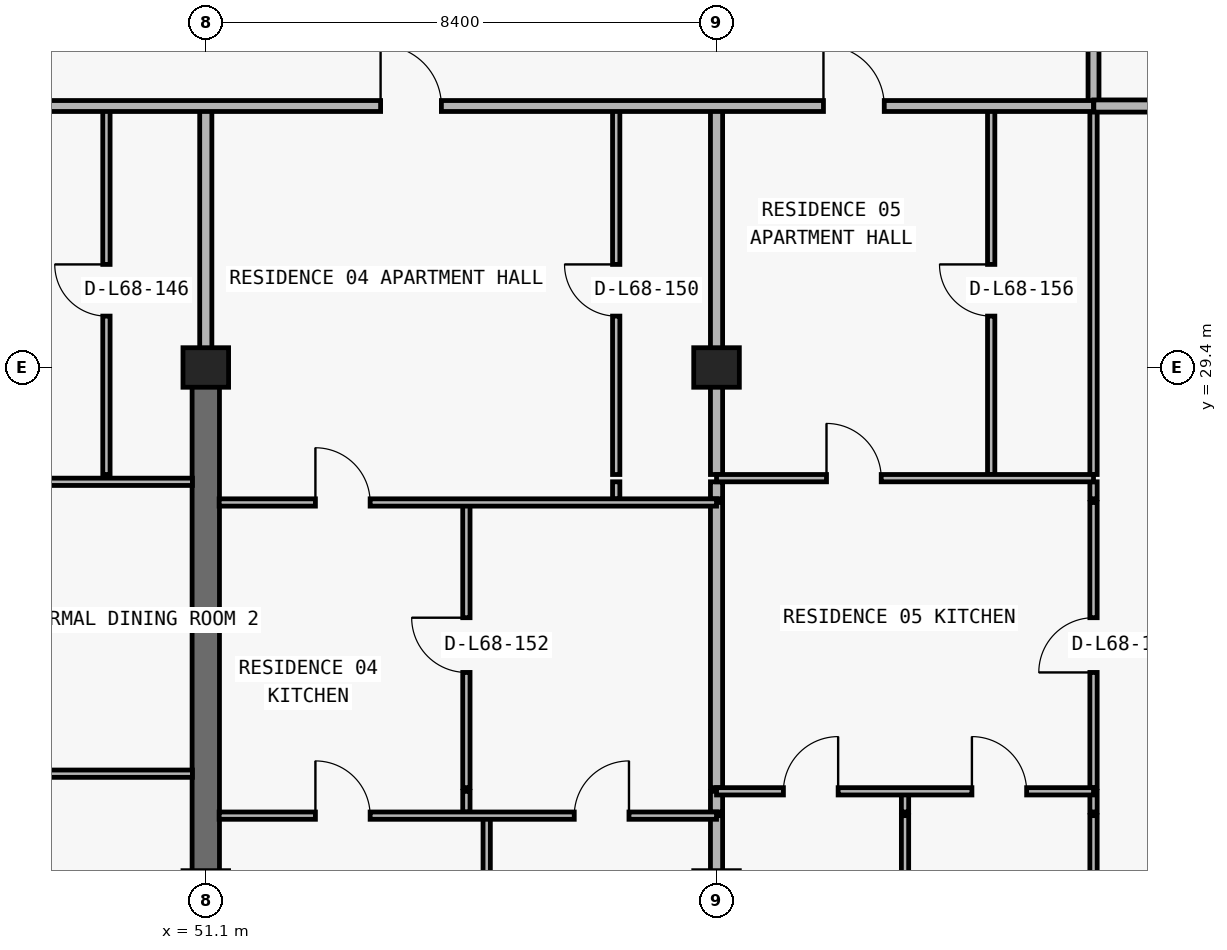
"""IFC4 building model, lengths in metres.
Left out: names, types, materials, properties, quantities, classifications, styles, units other than length and angle.
Written with IfcOpenShell. Run it as: python <this file> out.ifc"""

import sys

from ifc_helpers import new_model, si_unit, direction, frame, frame_2d, origin, origin_2d, place, context, subcontext, project, spatial, rectangle, extrude, element, fill, save


model = new_model("IFC4")
c1 = context("Model", 3, precision=1e-05, world=origin(), true_north=direction((0.0, 1.0)))
c2 = subcontext(c1, "Body", "Model", "MODEL_VIEW")
j1 = project(units=[si_unit("LENGTHUNIT", "METRE"), si_unit("PLANEANGLEUNIT", "RADIAN")], contexts=[c1])
p1 = place(None, origin())
s1 = spatial("IfcSite", under=j1, at=p1, CompositionType="ELEMENT")
p2 = place(p1, origin())
s2 = spatial("IfcBuilding", under=s1, at=p2, CompositionType="ELEMENT")
p3 = place(p2, frame((0.0, 0.0, 243.0)))
s3 = spatial("IfcBuildingStorey", under=s2, at=p3, CompositionType="ELEMENT", Elevation=243.0)
for number, where, z_axis, x_axis in (
    (1, (51.1, 29.4, 0.0), (0.0, 0.0, 1.0), (1.0, 0.0, 0.0)),
    (2, (59.5, 29.4, 0.0), (0.0, 0.0, 1.0), (1.0, 0.0, 0.0)),
):
    element("IfcColumn", number, at=place(p3, frame(where, z_axis=z_axis, x_axis=x_axis)), inside=s3, PredefinedType="COLUMN", context=c2, shape_type="SweptSolid", body=[
        extrude(rectangle(XDim=0.75, YDim=0.65, at=origin_2d()), origin(), (0.0, 0.0, 1.0), 3.05),
    ])
p4 = place(p3, frame((51.1, 20.8, 0.0), z_axis=(0.0, 0.0, 1.0), x_axis=(0.0, 1.0, 0.0)))
e3 = element("IfcWall", 3, at=p4, inside=s3, PredefinedType="SHEAR", context=c2, shape_type="SweptSolid", body=[
    extrude(rectangle(XDim=8.6, YDim=0.45, at=frame_2d((4.3, 0.0))), origin(), (0.0, 0.0, 1.0), 3.05),
])
p5 = place(p3, frame((49.466, 27.64, 0.0), z_axis=(0.0, 0.0, 1.0), x_axis=(0.0, 1.0, 0.0)))
e4 = element("IfcWall", 4, at=p5, inside=s3, PredefinedType="PARTITIONING", context=c2, shape_type="SweptSolid", body=[
    extrude(rectangle(XDim=6.06, YDim=0.12, at=frame_2d((3.03, 0.0))), origin(), (0.0, 0.0, 1.0), 3.05),
])
p6 = place(p5, frame((2.605, 0.0, 0.0)))
e5 = element("IfcOpeningElement", 5, at=p6, cuts=e4, PredefinedType="OPENING", context=c2, shape_type="SweptSolid", body=[
    extrude(rectangle(XDim=0.85, YDim=2.1, at=frame_2d((0.425, 1.05))), frame((0.0, 0.07, 0.0), z_axis=(0.0, -1.0, 0.0), x_axis=(1.0, 0.0, 0.0)), (0.0, 0.0, 1.0), 0.14),
])
p7 = place(p3, frame((51.1, 29.405, 0.0), z_axis=(0.0, 0.0, 1.0), x_axis=(0.0, 1.0, 0.0)))
e6 = element("IfcWall", 6, at=p7, inside=s3, PredefinedType="PARTITIONING", context=c2, shape_type="SweptSolid", body=[
    extrude(rectangle(XDim=4.295, YDim=0.2, at=frame_2d((2.147, 0.0))), origin(), (0.0, 0.0, 1.0), 2.335),
])
p8 = place(p3, frame((55.386, 22.09, 0.0), z_axis=(0.0, 0.0, 1.0), x_axis=(0.0, 1.0, 0.0)))
e7 = element("IfcWall", 7, at=p8, inside=s3, PredefinedType="PARTITIONING", context=c2, shape_type="SweptSolid", body=[
    extrude(rectangle(XDim=0.34, YDim=0.12, at=frame_2d((0.17, 0.0))), origin(), (0.0, 0.0, 1.0), 3.05),
])
p9 = place(p3, frame((55.386, 22.49, 0.0), z_axis=(0.0, 0.0, 1.0), x_axis=(0.0, 1.0, 0.0)))
e8 = element("IfcWall", 8, at=p9, inside=s3, PredefinedType="PARTITIONING", context=c2, shape_type="SweptSolid", body=[
    extrude(rectangle(XDim=4.69, YDim=0.12, at=frame_2d((2.345, 0.0))), origin(), (0.0, 0.0, 1.0), 3.05),
])
p10 = place(p9, frame((1.895, 0.0, 0.0)))
e9 = element("IfcOpeningElement", 9, at=p10, cuts=e8, PredefinedType="OPENING", context=c2, shape_type="SweptSolid", body=[
    extrude(rectangle(XDim=0.9, YDim=2.15, at=frame_2d((0.45, 1.075))), frame((0.0, 0.07, 0.0), z_axis=(0.0, -1.0, 0.0), x_axis=(1.0, 0.0, 0.0)), (0.0, 0.0, 1.0), 0.14),
])
p11 = place(p3, frame((55.72, 13.34, 0.0), z_axis=(0.0, 0.0, 1.0), x_axis=(0.0, 1.0, 0.0)))
e10 = element("IfcWall", 10, at=p11, inside=s3, PredefinedType="PARTITIONING", context=c2, shape_type="SweptSolid", body=[
    extrude(rectangle(XDim=8.69, YDim=0.12, at=frame_2d((4.345, 0.0))), origin(), (0.0, 0.0, 1.0), 3.05),
])
p12 = place(p3, frame((57.85, 27.24, 0.0), z_axis=(0.0, 0.0, 1.0), x_axis=(0.0, 1.0, 0.0)))
e11 = element("IfcWall", 11, at=p12, inside=s3, PredefinedType="PARTITIONING", context=c2, shape_type="SweptSolid", body=[
    extrude(rectangle(XDim=0.28, YDim=0.12, at=frame_2d((0.14, 0.0))), origin(), (0.0, 0.0, 1.0), 3.05),
])
p13 = place(p3, frame((57.85, 27.64, 0.0), z_axis=(0.0, 0.0, 1.0), x_axis=(0.0, 1.0, 0.0)))
e12 = element("IfcWall", 12, at=p13, inside=s3, PredefinedType="PARTITIONING", context=c2, shape_type="SweptSolid", body=[
    extrude(rectangle(XDim=6.06, YDim=0.12, at=frame_2d((3.03, 0.0))), origin(), (0.0, 0.0, 1.0), 3.05),
])
p14 = place(p13, frame((2.605, 0.0, 0.0)))
e13 = element("IfcOpeningElement", 13, at=p14, cuts=e12, PredefinedType="OPENING", context=c2, shape_type="SweptSolid", body=[
    extrude(rectangle(XDim=0.85, YDim=2.1, at=frame_2d((0.425, 1.05))), frame((0.0, 0.07, 0.0), z_axis=(0.0, -1.0, 0.0), x_axis=(1.0, 0.0, 0.0)), (0.0, 0.0, 1.0), 0.14),
])
p15 = place(p3, frame((59.5, 13.34, 0.0), z_axis=(0.0, 0.0, 1.0), x_axis=(0.0, 1.0, 0.0)))
e14 = element("IfcWall", 14, at=p15, inside=s3, PredefinedType="PARTITIONING", context=c2, shape_type="SweptSolid", body=[
    extrude(rectangle(XDim=8.69, YDim=0.2, at=frame_2d((4.345, 0.0))), origin(), (0.0, 0.0, 1.0), 2.263),
])
p16 = place(p3, frame((59.5, 22.09, 0.0), z_axis=(0.0, 0.0, 1.0), x_axis=(0.0, 1.0, 0.0)))
e15 = element("IfcWall", 15, at=p16, inside=s3, PredefinedType="PARTITIONING", context=c2, shape_type="SweptSolid", body=[
    extrude(rectangle(XDim=0.34, YDim=0.2, at=frame_2d((0.17, 0.0))), origin(), (0.0, 0.0, 1.0), 2.263),
])
p17 = place(p3, frame((59.5, 22.49, 0.0), z_axis=(0.0, 0.0, 1.0), x_axis=(0.0, 1.0, 0.0)))
e16 = element("IfcWall", 16, at=p17, inside=s3, PredefinedType="PARTITIONING", context=c2, shape_type="SweptSolid", body=[
    extrude(rectangle(XDim=4.69, YDim=0.2, at=frame_2d((2.345, 0.0))), origin(), (0.0, 0.0, 1.0), 2.263),
])
p18 = place(p3, frame((59.5, 27.24, 0.0), z_axis=(0.0, 0.0, 1.0), x_axis=(0.0, 1.0, 0.0)))
e17 = element("IfcWall", 17, at=p18, inside=s3, PredefinedType="PARTITIONING", context=c2, shape_type="SweptSolid", body=[
    extrude(rectangle(XDim=0.28, YDim=0.2, at=frame_2d((0.14, 0.0))), origin(), (0.0, 0.0, 1.0), 2.263),
])
p19 = place(p3, frame((59.5, 27.64, 0.0), z_axis=(0.0, 0.0, 1.0), x_axis=(0.0, 1.0, 0.0)))
e18 = element("IfcWall", 18, at=p19, inside=s3, PredefinedType="PARTITIONING", context=c2, shape_type="SweptSolid", body=[
    extrude(rectangle(XDim=6.06, YDim=0.2, at=frame_2d((3.03, 0.0))), origin(), (0.0, 0.0, 1.0), 2.263),
])
p20 = place(p3, frame((62.6, 13.34, 0.0), z_axis=(0.0, 0.0, 1.0), x_axis=(0.0, 1.0, 0.0)))
e19 = element("IfcWall", 19, at=p20, inside=s3, PredefinedType="PARTITIONING", context=c2, shape_type="SweptSolid", body=[
    extrude(rectangle(XDim=8.69, YDim=0.12, at=frame_2d((4.345, 0.0))), origin(), (0.0, 0.0, 1.0), 3.05),
])
p21 = place(p3, frame((62.6, 22.09, 0.0), z_axis=(0.0, 0.0, 1.0), x_axis=(0.0, 1.0, 0.0)))
e20 = element("IfcWall", 20, at=p21, inside=s3, PredefinedType="PARTITIONING", context=c2, shape_type="SweptSolid", body=[
    extrude(rectangle(XDim=0.34, YDim=0.12, at=frame_2d((0.17, 0.0))), origin(), (0.0, 0.0, 1.0), 3.05),
])
p22 = place(p3, frame((64.017, 27.64, 0.0), z_axis=(0.0, 0.0, 1.0), x_axis=(0.0, 1.0, 0.0)))
e21 = element("IfcWall", 21, at=p22, inside=s3, PredefinedType="PARTITIONING", context=c2, shape_type="SweptSolid", body=[
    extrude(rectangle(XDim=6.06, YDim=0.12, at=frame_2d((3.03, 0.0))), origin(), (0.0, 0.0, 1.0), 3.05),
])
p23 = place(p22, frame((2.605, 0.0, 0.0)))
e22 = element("IfcOpeningElement", 22, at=p23, cuts=e21, PredefinedType="OPENING", context=c2, shape_type="SweptSolid", body=[
    extrude(rectangle(XDim=0.85, YDim=2.1, at=frame_2d((0.425, 1.05))), frame((0.0, 0.07, 0.0), z_axis=(0.0, -1.0, 0.0), x_axis=(1.0, 0.0, 0.0)), (0.0, 0.0, 1.0), 0.14),
])
p24 = place(p3, frame((65.7, 13.42, 0.0), z_axis=(0.0, 0.0, 1.0), x_axis=(0.0, 1.0, 0.0)))
e23 = element("IfcWall", 23, at=p24, inside=s3, PredefinedType="PARTITIONING", context=c2, shape_type="SweptSolid", body=[
    extrude(rectangle(XDim=8.61, YDim=0.12, at=frame_2d((4.305, 0.0))), origin(), (0.0, 0.0, 1.0), 3.05),
])
p25 = place(p3, frame((65.7, 22.09, 0.0), z_axis=(0.0, 0.0, 1.0), x_axis=(0.0, 1.0, 0.0)))
e24 = element("IfcWall", 24, at=p25, inside=s3, PredefinedType="PARTITIONING", context=c2, shape_type="SweptSolid", body=[
    extrude(rectangle(XDim=0.34, YDim=0.12, at=frame_2d((0.17, 0.0))), origin(), (0.0, 0.0, 1.0), 3.05),
])
p26 = place(p3, frame((65.7, 22.49, 0.0), z_axis=(0.0, 0.0, 1.0), x_axis=(0.0, 1.0, 0.0)))
e25 = element("IfcWall", 25, at=p26, inside=s3, PredefinedType="PARTITIONING", context=c2, shape_type="SweptSolid", body=[
    extrude(rectangle(XDim=4.69, YDim=0.12, at=frame_2d((2.345, 0.0))), origin(), (0.0, 0.0, 1.0), 3.05),
])
p27 = place(p26, frame((1.895, 0.0, 0.0)))
e26 = element("IfcOpeningElement", 26, at=p27, cuts=e25, PredefinedType="OPENING", context=c2, shape_type="SweptSolid", body=[
    extrude(rectangle(XDim=0.9, YDim=2.15, at=frame_2d((0.45, 1.075))), frame((0.0, 0.07, 0.0), z_axis=(0.0, -1.0, 0.0), x_axis=(1.0, 0.0, 0.0)), (0.0, 0.0, 1.0), 0.14),
])
p28 = place(p3, frame((65.7, 27.24, 0.0), z_axis=(0.0, 0.0, 1.0), x_axis=(0.0, 1.0, 0.0)))
e27 = element("IfcWall", 27, at=p28, inside=s3, PredefinedType="PARTITIONING", context=c2, shape_type="SweptSolid", body=[
    extrude(rectangle(XDim=0.28, YDim=0.12, at=frame_2d((0.14, 0.0))), origin(), (0.0, 0.0, 1.0), 3.05),
])
p29 = place(p3, frame((65.7, 27.64, 0.0), z_axis=(0.0, 0.0, 1.0), x_axis=(0.0, 1.0, 0.0)))
e28 = element("IfcWall", 28, at=p29, inside=s3, PredefinedType="PARTITIONING", context=c2, shape_type="SweptSolid", body=[
    extrude(rectangle(XDim=6.06, YDim=0.12, at=frame_2d((3.03, 0.0))), origin(), (0.0, 0.0, 1.0), 3.05),
])
p30 = place(p3, frame((65.7, 33.705, 0.0), z_axis=(0.0, 0.0, 1.0), x_axis=(0.0, 1.0, 0.0)))
e29 = element("IfcWall", 29, at=p30, inside=s3, PredefinedType="PARTITIONING", context=c2, shape_type="SweptSolid", body=[
    extrude(rectangle(XDim=3.295, YDim=0.18, at=frame_2d((1.647, 0.0))), origin(), (0.0, 0.0, 1.0), 3.05),
])
p31 = place(p3, frame((51.32, 22.03, 0.0), z_axis=(0.0, 0.0, 1.0), x_axis=(1.0, 0.0, 0.0)))
e30 = element("IfcWall", 30, at=p31, inside=s3, PredefinedType="PARTITIONING", context=c2, shape_type="SweptSolid", body=[
    extrude(rectangle(XDim=8.18, YDim=0.12, at=frame_2d((4.09, 0.0))), origin(), (0.0, 0.0, 1.0), 3.05),
])
p32 = place(p31, frame((1.583, 0.0, 0.0)))
e31 = element("IfcOpeningElement", 31, at=p32, cuts=e30, PredefinedType="OPENING", context=c2, shape_type="SweptSolid", body=[
    extrude(rectangle(XDim=0.9, YDim=2.15, at=frame_2d((0.45, 1.075))), frame((0.0, 0.07, 0.0), z_axis=(0.0, -1.0, 0.0), x_axis=(1.0, 0.0, 0.0)), (0.0, 0.0, 1.0), 0.14),
])
p33 = place(p31, frame((5.84, 0.0, 0.0)))
e32 = element("IfcOpeningElement", 32, at=p33, cuts=e30, PredefinedType="OPENING", context=c2, shape_type="SweptSolid", body=[
    extrude(rectangle(XDim=0.9, YDim=2.15, at=frame_2d((0.45, 1.075))), frame((0.0, 0.07, 0.0), z_axis=(0.0, -1.0, 0.0), x_axis=(1.0, 0.0, 0.0)), (0.0, 0.0, 1.0), 0.14),
])
p34 = place(p3, frame((59.5, 22.43, 0.0), z_axis=(0.0, 0.0, 1.0), x_axis=(1.0, 0.0, 0.0)))
e33 = element("IfcWall", 33, at=p34, inside=s3, PredefinedType="PARTITIONING", context=c2, shape_type="SweptSolid", body=[
    extrude(rectangle(XDim=6.2, YDim=0.12, at=frame_2d((3.1, 0.0))), origin(), (0.0, 0.0, 1.0), 3.05),
])
p35 = place(p34, frame((1.1, 0.0, 0.0)))
e34 = element("IfcOpeningElement", 34, at=p35, cuts=e33, PredefinedType="OPENING", context=c2, shape_type="SweptSolid", body=[
    extrude(rectangle(XDim=0.9, YDim=2.15, at=frame_2d((0.45, 1.075))), frame((0.0, 0.07, 0.0), z_axis=(0.0, -1.0, 0.0), x_axis=(1.0, 0.0, 0.0)), (0.0, 0.0, 1.0), 0.14),
])
p36 = place(p34, frame((4.2, 0.0, 0.0)))
e35 = element("IfcOpeningElement", 35, at=p36, cuts=e33, PredefinedType="OPENING", context=c2, shape_type="SweptSolid", body=[
    extrude(rectangle(XDim=0.9, YDim=2.15, at=frame_2d((0.45, 1.075))), frame((0.0, 0.07, 0.0), z_axis=(0.0, -1.0, 0.0), x_axis=(1.0, 0.0, 0.0)), (0.0, 0.0, 1.0), 0.14),
])
p37 = place(p3, frame((42.7, 22.72, 0.0), z_axis=(0.0, 0.0, 1.0), x_axis=(1.0, 0.0, 0.0)))
e36 = element("IfcWall", 36, at=p37, inside=s3, PredefinedType="PARTITIONING", context=c2, shape_type="SweptSolid", body=[
    extrude(rectangle(XDim=8.18, YDim=0.12, at=frame_2d((4.09, 0.0))), origin(), (0.0, 0.0, 1.0), 3.05),
])
p38 = place(p37, frame((3.64, 0.0, 0.0)))
e37 = element("IfcOpeningElement", 37, at=p38, cuts=e36, PredefinedType="OPENING", context=c2, shape_type="SweptSolid", body=[
    extrude(rectangle(XDim=0.9, YDim=2.15, at=frame_2d((0.45, 1.075))), frame((0.0, 0.07, 0.0), z_axis=(0.0, -1.0, 0.0), x_axis=(1.0, 0.0, 0.0)), (0.0, 0.0, 1.0), 0.14),
])
p39 = place(p3, frame((51.32, 27.18, 0.0), z_axis=(0.0, 0.0, 1.0), x_axis=(1.0, 0.0, 0.0)))
e38 = element("IfcWall", 38, at=p39, inside=s3, PredefinedType="PARTITIONING", context=c2, shape_type="SweptSolid", body=[
    extrude(rectangle(XDim=8.18, YDim=0.12, at=frame_2d((4.09, 0.0))), origin(), (0.0, 0.0, 1.0), 3.05),
])
p40 = place(p39, frame((1.583, 0.0, 0.0)))
e39 = element("IfcOpeningElement", 39, at=p40, cuts=e38, PredefinedType="OPENING", context=c2, shape_type="SweptSolid", body=[
    extrude(rectangle(XDim=0.9, YDim=2.15, at=frame_2d((0.45, 1.075))), frame((0.0, 0.07, 0.0), z_axis=(0.0, -1.0, 0.0), x_axis=(1.0, 0.0, 0.0)), (0.0, 0.0, 1.0), 0.14),
])
p41 = place(p3, frame((42.705, 27.52, 0.0), z_axis=(0.0, 0.0, 1.0), x_axis=(1.0, 0.0, 0.0)))
e40 = element("IfcWall", 40, at=p41, inside=s3, PredefinedType="PARTITIONING", context=c2, shape_type="SweptSolid", body=[
    extrude(rectangle(XDim=8.175, YDim=0.12, at=frame_2d((4.087, 0.0))), origin(), (0.0, 0.0, 1.0), 3.05),
])
p42 = place(p41, frame((2.93, 0.0, 0.0)))
e41 = element("IfcOpeningElement", 41, at=p42, cuts=e40, PredefinedType="OPENING", context=c2, shape_type="SweptSolid", body=[
    extrude(rectangle(XDim=0.9, YDim=2.15, at=frame_2d((0.45, 1.075))), frame((0.0, 0.07, 0.0), z_axis=(0.0, -1.0, 0.0), x_axis=(1.0, 0.0, 0.0)), (0.0, 0.0, 1.0), 0.14),
])
p43 = place(p3, frame((59.5, 27.58, 0.0), z_axis=(0.0, 0.0, 1.0), x_axis=(1.0, 0.0, 0.0)))
e42 = element("IfcWall", 42, at=p43, inside=s3, PredefinedType="PARTITIONING", context=c2, shape_type="SweptSolid", body=[
    extrude(rectangle(XDim=6.2, YDim=0.12, at=frame_2d((3.1, 0.0))), origin(), (0.0, 0.0, 1.0), 3.05),
])
p44 = place(p43, frame((1.809, 0.0, 0.0)))
e43 = element("IfcOpeningElement", 43, at=p44, cuts=e42, PredefinedType="OPENING", context=c2, shape_type="SweptSolid", body=[
    extrude(rectangle(XDim=0.9, YDim=2.15, at=frame_2d((0.45, 1.075))), frame((0.0, 0.07, 0.0), z_axis=(0.0, -1.0, 0.0), x_axis=(1.0, 0.0, 0.0)), (0.0, 0.0, 1.0), 0.14),
])
p45 = place(p3, frame((41.2, 33.7, 0.0), z_axis=(0.0, 0.0, 1.0), x_axis=(1.0, 0.0, 0.0)))
e44 = element("IfcWall", 44, at=p45, inside=s3, PredefinedType="PARTITIONING", context=c2, shape_type="SweptSolid", body=[
    extrude(rectangle(XDim=24.5, YDim=0.18, at=frame_2d((12.25, 0.0))), origin(), (0.0, 0.0, 1.0), 3.05),
])
p46 = place(p45, frame((12.775, 0.0, 0.0)))
e45 = element("IfcOpeningElement", 45, at=p46, cuts=e44, PredefinedType="OPENING", context=c2, shape_type="SweptSolid", body=[
    extrude(rectangle(XDim=1.0, YDim=2.2, at=frame_2d((0.5, 1.1))), frame((0.0, 0.1, 0.0), z_axis=(0.0, -1.0, 0.0), x_axis=(1.0, 0.0, 0.0)), (0.0, 0.0, 1.0), 0.2),
])
p47 = place(p45, frame((20.059, 0.0, 0.0)))
e46 = element("IfcOpeningElement", 46, at=p47, cuts=e44, PredefinedType="OPENING", context=c2, shape_type="SweptSolid", body=[
    extrude(rectangle(XDim=1.0, YDim=2.2, at=frame_2d((0.5, 1.1))), frame((0.0, 0.1, 0.0), z_axis=(0.0, -1.0, 0.0), x_axis=(1.0, 0.0, 0.0)), (0.0, 0.0, 1.0), 0.2),
])
p48 = place(p3, frame((65.705, 33.7, 0.0), z_axis=(0.0, 0.0, 1.0), x_axis=(1.0, 0.0, 0.0)))
e47 = element("IfcWall", 47, at=p48, inside=s3, PredefinedType="PARTITIONING", context=c2, shape_type="SweptSolid", body=[
    extrude(rectangle(XDim=3.7, YDim=0.2, at=frame_2d((1.85, 0.0))), origin(), (0.0, 0.0, 1.0), 3.05),
])
p49 = place(p6, origin())
e48 = element("IfcDoor", 48, at=p49, inside=s3, OperationType="SINGLE_SWING_RIGHT", PredefinedType="DOOR", context=c2, shape_type="SweptSolid", body=[
    extrude(rectangle(XDim=0.85, YDim=2.1, at=frame_2d((0.425, 1.05))), frame((0.0, 0.025, 0.0), z_axis=(0.0, -1.0, 0.0), x_axis=(1.0, 0.0, 0.0)), (0.0, 0.0, 1.0), 0.05),
])
fill(e5, e48)
p50 = place(p46, origin())
e49 = element("IfcDoor", 49, at=p50, inside=s3, OperationType="SINGLE_SWING_LEFT", PredefinedType="DOOR", context=c2, shape_type="SweptSolid", body=[
    extrude(rectangle(XDim=1.0, YDim=2.2, at=frame_2d((0.5, 1.1))), frame((0.0, 0.025, 0.0), z_axis=(0.0, -1.0, 0.0), x_axis=(1.0, 0.0, 0.0)), (0.0, 0.0, 1.0), 0.05),
])
fill(e45, e49)
p51 = place(p14, origin())
e50 = element("IfcDoor", 50, at=p51, inside=s3, OperationType="SINGLE_SWING_RIGHT", PredefinedType="DOOR", context=c2, shape_type="SweptSolid", body=[
    extrude(rectangle(XDim=0.85, YDim=2.1, at=frame_2d((0.425, 1.05))), frame((0.0, 0.025, 0.0), z_axis=(0.0, -1.0, 0.0), x_axis=(1.0, 0.0, 0.0)), (0.0, 0.0, 1.0), 0.05),
])
fill(e13, e50)
p52 = place(p40, origin())
e51 = element("IfcDoor", 51, at=p52, inside=s3, OperationType="SINGLE_SWING_LEFT", PredefinedType="DOOR", context=c2, shape_type="SweptSolid", body=[
    extrude(rectangle(XDim=0.9, YDim=2.15, at=frame_2d((0.45, 1.075))), frame((0.0, 0.025, 0.0), z_axis=(0.0, -1.0, 0.0), x_axis=(1.0, 0.0, 0.0)), (0.0, 0.0, 1.0), 0.05),
])
fill(e39, e51)
p53 = place(p10, origin())
e52 = element("IfcDoor", 52, at=p53, inside=s3, OperationType="SINGLE_SWING_RIGHT", PredefinedType="DOOR", context=c2, shape_type="SweptSolid", body=[
    extrude(rectangle(XDim=0.9, YDim=2.15, at=frame_2d((0.45, 1.075))), frame((0.0, 0.025, 0.0), z_axis=(0.0, -1.0, 0.0), x_axis=(1.0, 0.0, 0.0)), (0.0, 0.0, 1.0), 0.05),
])
fill(e9, e52)
p54 = place(p32, origin())
e53 = element("IfcDoor", 53, at=p54, inside=s3, OperationType="SINGLE_SWING_LEFT", PredefinedType="DOOR", context=c2, shape_type="SweptSolid", body=[
    extrude(rectangle(XDim=0.9, YDim=2.15, at=frame_2d((0.45, 1.075))), frame((0.0, 0.025, 0.0), z_axis=(0.0, -1.0, 0.0), x_axis=(1.0, 0.0, 0.0)), (0.0, 0.0, 1.0), 0.05),
])
fill(e31, e53)
p55 = place(p33, origin())
e54 = element("IfcDoor", 54, at=p55, inside=s3, OperationType="SINGLE_SWING_RIGHT", PredefinedType="DOOR", context=c2, shape_type="SweptSolid", body=[
    extrude(rectangle(XDim=0.9, YDim=2.15, at=frame_2d((0.45, 1.075))), frame((0.0, 0.025, 0.0), z_axis=(0.0, -1.0, 0.0), x_axis=(1.0, 0.0, 0.0)), (0.0, 0.0, 1.0), 0.05),
])
fill(e32, e54)
p56 = place(p47, origin())
e55 = element("IfcDoor", 55, at=p56, inside=s3, OperationType="SINGLE_SWING_LEFT", PredefinedType="DOOR", context=c2, shape_type="SweptSolid", body=[
    extrude(rectangle(XDim=1.0, YDim=2.2, at=frame_2d((0.5, 1.1))), frame((0.0, 0.025, 0.0), z_axis=(0.0, -1.0, 0.0), x_axis=(1.0, 0.0, 0.0)), (0.0, 0.0, 1.0), 0.05),
])
fill(e46, e55)
p57 = place(p23, origin())
e56 = element("IfcDoor", 56, at=p57, inside=s3, OperationType="SINGLE_SWING_RIGHT", PredefinedType="DOOR", context=c2, shape_type="SweptSolid", body=[
    extrude(rectangle(XDim=0.85, YDim=2.1, at=frame_2d((0.425, 1.05))), frame((0.0, 0.025, 0.0), z_axis=(0.0, -1.0, 0.0), x_axis=(1.0, 0.0, 0.0)), (0.0, 0.0, 1.0), 0.05),
])
fill(e22, e56)
p58 = place(p44, origin())
e57 = element("IfcDoor", 57, at=p58, inside=s3, OperationType="SINGLE_SWING_LEFT", PredefinedType="DOOR", context=c2, shape_type="SweptSolid", body=[
    extrude(rectangle(XDim=0.9, YDim=2.15, at=frame_2d((0.45, 1.075))), frame((0.0, 0.025, 0.0), z_axis=(0.0, -1.0, 0.0), x_axis=(1.0, 0.0, 0.0)), (0.0, 0.0, 1.0), 0.05),
])
fill(e43, e57)
p59 = place(p35, origin())
e58 = element("IfcDoor", 58, at=p59, inside=s3, OperationType="SINGLE_SWING_RIGHT", PredefinedType="DOOR", context=c2, shape_type="SweptSolid", body=[
    extrude(rectangle(XDim=0.9, YDim=2.15, at=frame_2d((0.45, 1.075))), frame((0.0, 0.025, 0.0), z_axis=(0.0, -1.0, 0.0), x_axis=(1.0, 0.0, 0.0)), (0.0, 0.0, 1.0), 0.05),
])
fill(e34, e58)
p60 = place(p36, origin())
e59 = element("IfcDoor", 59, at=p60, inside=s3, OperationType="SINGLE_SWING_LEFT", PredefinedType="DOOR", context=c2, shape_type="SweptSolid", body=[
    extrude(rectangle(XDim=0.9, YDim=2.15, at=frame_2d((0.45, 1.075))), frame((0.0, 0.025, 0.0), z_axis=(0.0, -1.0, 0.0), x_axis=(1.0, 0.0, 0.0)), (0.0, 0.0, 1.0), 0.05),
])
fill(e35, e59)
p61 = place(p27, origin())
e60 = element("IfcDoor", 60, at=p61, inside=s3, OperationType="SINGLE_SWING_LEFT", PredefinedType="DOOR", context=c2, shape_type="SweptSolid", body=[
    extrude(rectangle(XDim=0.9, YDim=2.15, at=frame_2d((0.45, 1.075))), frame((0.0, 0.025, 0.0), z_axis=(0.0, -1.0, 0.0), x_axis=(1.0, 0.0, 0.0)), (0.0, 0.0, 1.0), 0.05),
])
fill(e26, e60)
save(model, sys.argv[1])
